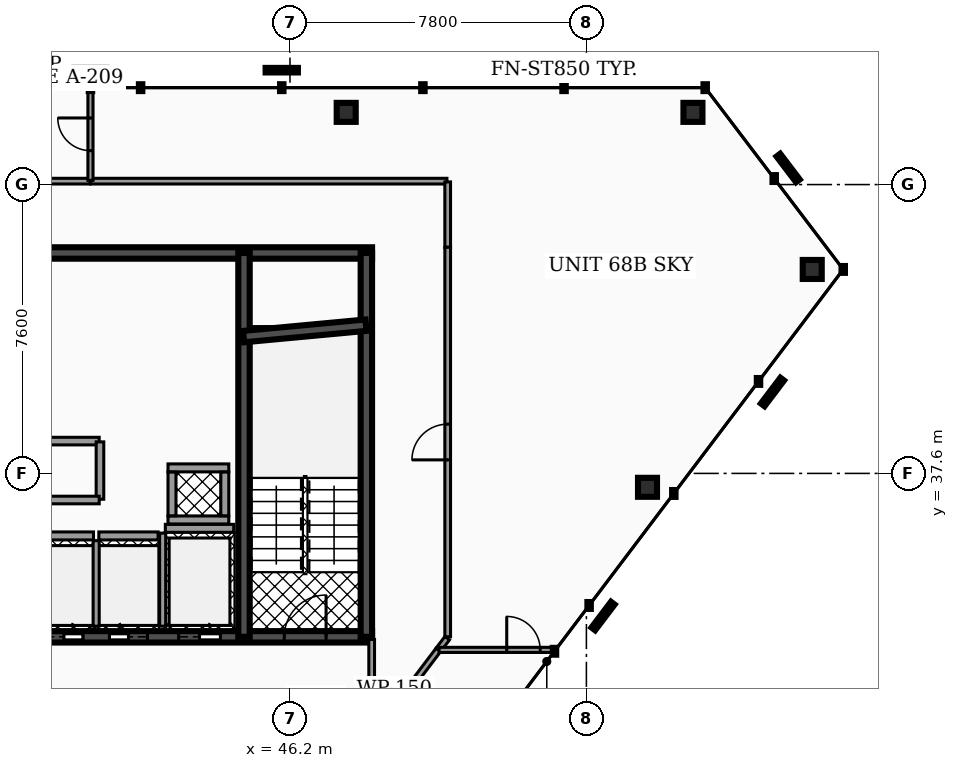
"""IFC4 building model, lengths in metres.
Left out: names, types, materials, properties, quantities, classifications, styles, units other than length and angle.
Written with IfcOpenShell. Run it as: python <this file> out.ifc"""

import sys

from ifc_helpers import new_model, si_unit, direction, frame, frame_2d, origin, origin_2d, place, context, subcontext, project, spatial, rectangle, hollow_rectangle, extrude, element, fill, save


model = new_model("IFC4")
c1 = context("Model", 3, precision=1e-05, world=origin(), true_north=direction((0.0, 1.0)))
c2 = subcontext(c1, "Body", "Model", "MODEL_VIEW")
j1 = project(units=[si_unit("LENGTHUNIT", "METRE"), si_unit("PLANEANGLEUNIT", "RADIAN")], contexts=[c1])
p1 = place(None, origin())
s1 = spatial("IfcSite", under=j1, at=p1, CompositionType="ELEMENT")
p2 = place(p1, origin())
s2 = spatial("IfcBuilding", under=s1, at=p2, CompositionType="ELEMENT")
p3 = place(p2, frame((0.0, 0.0, 268.6)))
s3 = spatial("IfcBuildingStorey", under=s2, at=p3, CompositionType="ELEMENT", Elevation=268.6)
p4 = place(p3, frame((28.5, 43.4, 0.0), z_axis=(0.0, 0.0, 1.0), x_axis=(1.0, 0.0, 0.0)))
e1 = element("IfcWall", 1, at=p4, inside=s3, PredefinedType="SHEAR", context=c2, shape_type="SweptSolid", body=[
    extrude(rectangle(XDim=19.86, YDim=0.3, at=frame_2d((9.93, 0.0))), origin(), (0.0, 0.0, 1.0), 3.18),
])
p5 = place(p3, frame((28.5, 33.3, 0.0), z_axis=(0.0, 0.0, 1.0), x_axis=(1.0, 0.0, 0.0)))
e2 = element("IfcWall", 2, at=p5, inside=s3, PredefinedType="SHEAR", context=c2, shape_type="SweptSolid", body=[
    extrude(rectangle(XDim=19.86, YDim=0.3, at=frame_2d((9.93, 0.0))), origin(), (0.0, 0.0, 1.0), 3.18),
])
p6 = place(p5, frame((3.93, 0.0, 0.0)))
e3 = element("IfcOpeningElement", 3, at=p6, cuts=e2, PredefinedType="OPENING", context=c2, shape_type="SweptSolid", body=[
    extrude(rectangle(XDim=1.1, YDim=2.15, at=frame_2d((0.55, 1.075))), frame((0.0, 0.16, 0.0), z_axis=(0.0, -1.0, 0.0), x_axis=(1.0, 0.0, 0.0)), (0.0, 0.0, 1.0), 0.32),
])
p7 = place(p5, frame((14.77, 0.0, 0.0)))
e4 = element("IfcOpeningElement", 4, at=p7, cuts=e2, PredefinedType="OPENING", context=c2, shape_type="SweptSolid", body=[
    extrude(rectangle(XDim=1.1, YDim=2.15, at=frame_2d((0.55, 1.075))), frame((0.0, 0.16, 0.0), z_axis=(0.0, -1.0, 0.0), x_axis=(1.0, 0.0, 0.0)), (0.0, 0.0, 1.0), 0.32),
])
p8 = place(p5, frame((11.25, 0.0, 0.0)))
e5 = element("IfcOpeningElement", 5, at=p8, cuts=e2, PredefinedType="OPENING", context=c2, shape_type="SweptSolid", body=[
    extrude(rectangle(XDim=1.0, YDim=2.1, at=frame_2d((0.5, 1.05))), frame((0.0, 0.16, 0.0), z_axis=(0.0, -1.0, 0.0), x_axis=(1.0, 0.0, 0.0)), (0.0, 0.0, 1.0), 0.32),
])
p9 = place(p5, frame((12.95, 0.0, 0.0)))
e6 = element("IfcOpeningElement", 6, at=p9, cuts=e2, PredefinedType="OPENING", context=c2, shape_type="SweptSolid", body=[
    extrude(rectangle(XDim=1.0, YDim=2.1, at=frame_2d((0.5, 1.05))), frame((0.0, 0.16, 0.0), z_axis=(0.0, -1.0, 0.0), x_axis=(1.0, 0.0, 0.0)), (0.0, 0.0, 1.0), 0.32),
])
p10 = place(p5, frame((5.85, 0.0, 0.0)))
e7 = element("IfcOpeningElement", 7, at=p10, cuts=e2, PredefinedType="OPENING", context=c2, shape_type="SweptSolid", body=[
    extrude(rectangle(XDim=1.0, YDim=2.1, at=frame_2d((0.5, 1.05))), frame((0.0, 0.16, 0.0), z_axis=(0.0, -1.0, 0.0), x_axis=(1.0, 0.0, 0.0)), (0.0, 0.0, 1.0), 0.32),
])
p11 = place(p5, frame((1.21, 0.0, 0.0)))
e8 = element("IfcOpeningElement", 8, at=p11, cuts=e2, PredefinedType="OPENING", context=c2, shape_type="SweptSolid", body=[
    extrude(rectangle(XDim=1.1, YDim=2.2, at=frame_2d((0.55, 1.1))), frame((0.0, 0.16, 0.0), z_axis=(0.0, -1.0, 0.0), x_axis=(1.0, 0.0, 0.0)), (0.0, 0.0, 1.0), 0.32),
])
p12 = place(p5, frame((9.34, 0.0, 0.0)))
e9 = element("IfcOpeningElement", 9, at=p12, cuts=e2, PredefinedType="OPENING", context=c2, shape_type="SweptSolid", body=[
    extrude(rectangle(XDim=1.12, YDim=2.05, at=frame_2d((0.56, 1.025))), frame((0.0, 0.16, 0.0), z_axis=(0.0, -1.0, 0.0), x_axis=(1.0, 0.0, 0.0)), (0.0, 0.0, 1.0), 0.32),
])
p13 = place(p5, frame((17.55, 0.0, 0.0)))
e10 = element("IfcOpeningElement", 10, at=p13, cuts=e2, PredefinedType="OPENING", context=c2, shape_type="SweptSolid", body=[
    extrude(rectangle(XDim=1.1, YDim=2.2, at=frame_2d((0.55, 1.1))), frame((0.0, 0.16, 0.0), z_axis=(0.0, -1.0, 0.0), x_axis=(1.0, 0.0, 0.0)), (0.0, 0.0, 1.0), 0.32),
])
for number, where, z_axis, x_axis in (
    (11, (44.99, 33.3, 0.0), (0.0, 0.0, 1.0), (0.0, 1.0, 0.0)),
    (12, (48.21, 33.3, 0.0), (0.0, 0.0, 1.0), (0.0, 1.0, 0.0)),
):
    element("IfcWall", number, at=place(p3, frame(where, z_axis=z_axis, x_axis=x_axis)), inside=s3, PredefinedType="SHEAR", context=c2, shape_type="SweptSolid", body=[
        extrude(rectangle(XDim=10.1, YDim=0.3, at=frame_2d((5.05, 0.0))), origin(), (0.0, 0.0, 1.0), 3.18),
    ])
p14 = place(p3, frame((44.98, 41.2, 0.0), z_axis=(0.0, 0.0, 1.0), x_axis=(0.995686468965, 0.09278176286, 0.0)))
e13 = element("IfcWall", 13, at=p14, inside=s3, PredefinedType="SHEAR", context=c2, shape_type="SweptSolid", body=[
    extrude(rectangle(XDim=3.234, YDim=0.3, at=frame_2d((1.617, 0.0))), origin(), (0.0, 0.0, 1.0), 3.18),
])
for number, where, z_axis, x_axis in (
    (14, (56.804, 47.1, 0.0), (0.0, 0.0, 1.0), (1.0, 0.0, 0.0)),
    (15, (47.679, 47.1, 0.0), (0.0, 0.0, 1.0), (1.0, 0.0, 0.0)),
    (16, (55.608, 37.234, 0.0), (0.0, 0.0, 1.0), (1.0, 0.0, 0.0)),
    (17, (59.943, 42.967, 0.0), (0.0, 0.0, 1.0), (1.0, 0.0, 0.0)),
):
    element("IfcColumn", number, at=place(p3, frame(where, z_axis=z_axis, x_axis=x_axis)), inside=s3, PredefinedType="COLUMN", context=c2, shape_type="SweptSolid", body=[
        extrude(hollow_rectangle(XDim=0.5, YDim=0.5, WallThickness=0.025, at=origin_2d()), origin(), (0.0, 0.0, 1.0), 3.18),
    ])
p15 = place(p3, frame((42.92, 36.155, 0.0), z_axis=(0.0, 0.0, 1.0), x_axis=(1.0, 0.0, 0.0)))
e18 = element("IfcWall", 18, at=p15, inside=s3, PredefinedType="SOLIDWALL", context=c2, shape_type="SweptSolid", body=[
    extrude(rectangle(XDim=1.8, YDim=0.21, at=frame_2d((0.9, 0.0))), origin(), (0.0, 0.0, 1.0), 3.18),
])
p16 = place(p3, frame((42.85, 33.58, 0.0), z_axis=(0.0, 0.0, 1.0), x_axis=(0.0, 1.0, 0.0)))
e19 = element("IfcWall", 19, at=p16, inside=s3, PredefinedType="SOLIDWALL", context=c2, shape_type="SweptSolid", body=[
    extrude(rectangle(XDim=2.45, YDim=0.16, at=frame_2d((1.225, 0.0))), origin(), (0.0, 0.0, 1.0), 3.18),
])
p17 = place(p3, frame((39.47, 35.955, 0.0), z_axis=(0.0, 0.0, 1.0), x_axis=(1.0, 0.0, 0.0)))
e20 = element("IfcWall", 20, at=p17, inside=s3, PredefinedType="SOLIDWALL", context=c2, shape_type="SweptSolid", body=[
    extrude(rectangle(XDim=1.56, YDim=0.21, at=frame_2d((0.78, 0.0))), origin(), (0.0, 0.0, 1.0), 3.18),
])
p18 = place(p3, frame((41.1, 33.58, 0.0), z_axis=(0.0, 0.0, 1.0), x_axis=(0.0, 1.0, 0.0)))
e21 = element("IfcWall", 21, at=p18, inside=s3, PredefinedType="SOLIDWALL", context=c2, shape_type="SweptSolid", body=[
    extrude(rectangle(XDim=2.25, YDim=0.16, at=frame_2d((1.125, 0.0))), origin(), (0.0, 0.0, 1.0), 3.18),
])
p19 = place(p3, frame((41.17, 35.955, 0.0), z_axis=(0.0, 0.0, 1.0), x_axis=(1.0, 0.0, 0.0)))
e22 = element("IfcWall", 22, at=p19, inside=s3, PredefinedType="SOLIDWALL", context=c2, shape_type="SweptSolid", body=[
    extrude(rectangle(XDim=1.56, YDim=0.21, at=frame_2d((0.78, 0.0))), origin(), (0.0, 0.0, 1.0), 3.18),
])
for number, where, z_axis, x_axis in (
    (23, (42.99, 36.375, 0.0), (0.0, 0.0, 1.0), (1.0, 0.0, 0.0)),
    (24, (42.99, 37.745, 0.0), (0.0, 0.0, 1.0), (1.0, 0.0, 0.0)),
):
    element("IfcWall", number, at=place(p3, frame(where, z_axis=z_axis, x_axis=x_axis)), inside=s3, PredefinedType="SOLIDWALL", context=c2, shape_type="SweptSolid", body=[
        extrude(rectangle(XDim=1.6, YDim=0.21, at=frame_2d((0.8, 0.0))), origin(), (0.0, 0.0, 1.0), 3.18),
    ])
for number, where, z_axis, x_axis in (
    (25, (43.095, 36.485, 0.0), (0.0, 0.0, 1.0), (0.0, 1.0, 0.0)),
    (26, (44.485, 36.485, 0.0), (0.0, 0.0, 1.0), (0.0, 1.0, 0.0)),
):
    element("IfcWall", number, at=place(p3, frame(where, z_axis=z_axis, x_axis=x_axis)), inside=s3, PredefinedType="SOLIDWALL", context=c2, shape_type="SweptSolid", body=[
        extrude(rectangle(XDim=1.15, YDim=0.21, at=frame_2d((0.575, 0.0))), origin(), (0.0, 0.0, 1.0), 3.18),
    ])
p20 = place(p3, frame((39.27, 38.45, 0.0), z_axis=(0.0, 0.0, 1.0), x_axis=(1.0, 0.0, 0.0)))
e27 = element("IfcWall", 27, at=p20, inside=s3, PredefinedType="PARTITIONING", context=c2, shape_type="SweptSolid", body=[
    extrude(rectangle(XDim=1.91, YDim=0.2, at=frame_2d((0.955, 0.0))), origin(), (0.0, 0.0, 1.0), 2.235),
])
p21 = place(p3, frame((41.2, 36.92, 0.0), z_axis=(0.0, 0.0, 1.0), x_axis=(0.0, 1.0, 0.0)))
e28 = element("IfcWall", 28, at=p21, inside=s3, PredefinedType="PARTITIONING", context=c2, shape_type="SweptSolid", body=[
    extrude(rectangle(XDim=1.51, YDim=0.2, at=frame_2d((0.755, 0.0))), origin(), (0.0, 0.0, 1.0), 2.235),
])
p22 = place(p3, frame((39.27, 36.9, 0.0), z_axis=(0.0, 0.0, 1.0), x_axis=(1.0, 0.0, 0.0)))
e29 = element("IfcWall", 29, at=p22, inside=s3, PredefinedType="PARTITIONING", context=c2, shape_type="SweptSolid", body=[
    extrude(rectangle(XDim=1.91, YDim=0.2, at=frame_2d((0.955, 0.0))), origin(), (0.0, 0.0, 1.0), 2.235),
])
p23 = place(p3, frame((48.35, 30.643, 0.0), z_axis=(0.0, 0.0, 1.0), x_axis=(0.0, 1.0, 0.0)))
e30 = element("IfcWall", 30, at=p23, inside=s3, PredefinedType="PARTITIONING", context=c2, shape_type="SweptSolid", body=[
    extrude(rectangle(XDim=2.587, YDim=0.15, at=frame_2d((1.294, 0.0))), origin(), (0.0, 0.0, 1.0), 2.235),
])
p24 = place(p3, frame((40.955, 45.29, 0.0), z_axis=(0.0, 0.0, 1.0), x_axis=(1.0, 0.0, 0.0)))
e31 = element("IfcWall", 31, at=p24, inside=s3, PredefinedType="PARTITIONING", context=c2, shape_type="SweptSolid", body=[
    extrude(rectangle(XDim=9.375, YDim=0.15, at=frame_2d((4.688, 0.0))), origin(), (0.0, 0.0, 1.0), 2.235),
])
p25 = place(p3, frame((50.35, 43.55, 0.0), z_axis=(0.0, 0.0, 1.0), x_axis=(0.0, 1.0, 0.0)))
e32 = element("IfcWall", 32, at=p25, inside=s3, PredefinedType="PARTITIONING", context=c2, shape_type="SweptSolid", body=[
    extrude(rectangle(XDim=1.72, YDim=0.15, at=frame_2d((0.86, 0.0))), origin(), (0.0, 0.0, 1.0), 2.235),
])
p26 = place(p3, frame((50.35, 33.302, 0.0), z_axis=(0.0, 0.0, 1.0), x_axis=(0.0, 1.0, 0.0)))
e33 = element("IfcWall", 33, at=p26, inside=s3, PredefinedType="PARTITIONING", context=c2, shape_type="SweptSolid", body=[
    extrude(rectangle(XDim=10.248, YDim=0.15, at=frame_2d((5.124, 0.0))), origin(), (0.0, 0.0, 1.0), 2.235),
])
p27 = place(p26, frame((4.654, 0.0, 0.0)))
e34 = element("IfcOpeningElement", 34, at=p27, cuts=e33, PredefinedType="OPENING", context=c2, shape_type="SweptSolid", body=[
    extrude(rectangle(XDim=0.94, YDim=2.05, at=frame_2d((0.47, 1.025))), frame((0.0, 0.085, 0.0), z_axis=(0.0, -1.0, 0.0), x_axis=(1.0, 0.0, 0.0)), (0.0, 0.0, 1.0), 0.17),
])
p28 = place(p3, frame((50.107, 32.96, 0.0), z_axis=(0.0, 0.0, 1.0), x_axis=(0.602950173728, 0.797778846549, 0.0)))
e35 = element("IfcWall", 35, at=p28, inside=s3, PredefinedType="PARTITIONING", context=c2, shape_type="SweptSolid", body=[
    extrude(rectangle(XDim=0.384, YDim=0.15, at=frame_2d((0.192, 0.0))), origin(), (0.0, 0.0, 1.0), 2.235),
])
p29 = place(p3, frame((48.362, 30.654, 0.0), z_axis=(0.0, 0.0, 1.0), x_axis=(0.603189668488, 0.79759778324, 0.0)))
e36 = element("IfcWall", 36, at=p29, inside=s3, PredefinedType="PARTITIONING", context=c2, shape_type="SweptSolid", body=[
    extrude(rectangle(XDim=2.886, YDim=0.15, at=frame_2d((1.443, 0.0))), origin(), (0.0, 0.0, 1.0), 2.235),
])
p30 = place(p3, frame((38.405, 45.29, 0.0), z_axis=(0.0, 0.0, 1.0), x_axis=(1.0, 0.0, 0.0)))
e37 = element("IfcWall", 37, at=p30, inside=s3, PredefinedType="PARTITIONING", context=c2, shape_type="SweptSolid", body=[
    extrude(rectangle(XDim=2.54, YDim=0.15, at=frame_2d((1.27, 0.0))), origin(), (0.0, 0.0, 1.0), 2.235),
])
p31 = place(p3, frame((50.124, 32.956, 0.0), z_axis=(0.0, 0.0, 1.0), x_axis=(1.0, 0.0, 0.0)))
e38 = element("IfcWall", 38, at=p31, inside=s3, PredefinedType="PARTITIONING", context=c2, shape_type="SweptSolid", body=[
    extrude(rectangle(XDim=3.049, YDim=0.135, at=frame_2d((1.525, 0.0))), origin(), (0.0, 0.0, 1.0), 2.235),
])
p32 = place(p31, frame((1.78, 0.0, 0.0)))
e39 = element("IfcOpeningElement", 39, at=p32, cuts=e38, PredefinedType="OPENING", context=c2, shape_type="SweptSolid", body=[
    extrude(rectangle(XDim=0.88, YDim=2.05, at=frame_2d((0.44, 1.025))), frame((0.0, 0.077, 0.0), z_axis=(0.0, -1.0, 0.0), x_axis=(1.0, 0.0, 0.0)), (0.0, 0.0, 1.0), 0.155),
])
p33 = place(p3, frame((40.95, 45.31, 0.0), z_axis=(0.0, 0.0, 1.0), x_axis=(0.0, 1.0, 0.0)))
e40 = element("IfcWall", 40, at=p33, inside=s3, PredefinedType="PARTITIONING", context=c2, shape_type="SweptSolid", body=[
    extrude(rectangle(XDim=2.425, YDim=0.135, at=frame_2d((1.212, 0.0))), origin(), (0.0, 0.0, 1.0), 2.235),
])
p34 = place(p33, frame((0.782, 0.0, 0.0)))
e41 = element("IfcOpeningElement", 41, at=p34, cuts=e40, PredefinedType="OPENING", context=c2, shape_type="SweptSolid", body=[
    extrude(rectangle(XDim=0.86, YDim=2.05, at=frame_2d((0.43, 1.025))), frame((0.0, 0.077, 0.0), z_axis=(0.0, -1.0, 0.0), x_axis=(1.0, 0.0, 0.0)), (0.0, 0.0, 1.0), 0.155),
])
p35 = place(p7, origin())
e42 = element("IfcDoor", 42, at=p35, inside=s3, OperationType="SLIDING_TO_RIGHT", PredefinedType="DOOR", context=c2, shape_type="SweptSolid", body=[
    extrude(rectangle(XDim=1.1, YDim=2.15, at=frame_2d((0.55, 1.075))), frame((0.0, 0.025, 0.0), z_axis=(0.0, -1.0, 0.0), x_axis=(1.0, 0.0, 0.0)), (0.0, 0.0, 1.0), 0.05),
])
fill(e4, e42)
p36 = place(p8, origin())
e43 = element("IfcDoor", 43, at=p36, inside=s3, OperationType="SLIDING_TO_RIGHT", PredefinedType="DOOR", context=c2, shape_type="SweptSolid", body=[
    extrude(rectangle(XDim=1.0, YDim=2.1, at=frame_2d((0.5, 1.05))), frame((0.0, 0.025, 0.0), z_axis=(0.0, -1.0, 0.0), x_axis=(1.0, 0.0, 0.0)), (0.0, 0.0, 1.0), 0.05),
])
fill(e5, e43)
p37 = place(p9, origin())
e44 = element("IfcDoor", 44, at=p37, inside=s3, OperationType="SLIDING_TO_LEFT", PredefinedType="DOOR", context=c2, shape_type="SweptSolid", body=[
    extrude(rectangle(XDim=1.0, YDim=2.1, at=frame_2d((0.5, 1.05))), frame((0.0, 0.025, 0.0), z_axis=(0.0, -1.0, 0.0), x_axis=(1.0, 0.0, 0.0)), (0.0, 0.0, 1.0), 0.05),
])
fill(e6, e44)
p38 = place(p13, origin())
e45 = element("IfcDoor", 45, at=p38, inside=s3, OperationType="SINGLE_SWING_RIGHT", PredefinedType="DOOR", context=c2, shape_type="SweptSolid", body=[
    extrude(rectangle(XDim=1.1, YDim=2.2, at=frame_2d((0.55, 1.1))), frame((0.0, 0.025, 0.0), z_axis=(0.0, -1.0, 0.0), x_axis=(1.0, 0.0, 0.0)), (0.0, 0.0, 1.0), 0.05),
])
fill(e10, e45)
p39 = place(p27, origin())
e46 = element("IfcDoor", 46, at=p39, inside=s3, OperationType="SINGLE_SWING_LEFT", PredefinedType="DOOR", context=c2, shape_type="SweptSolid", body=[
    extrude(rectangle(XDim=0.94, YDim=2.05, at=frame_2d((0.47, 1.025))), frame((0.0, 0.025, 0.0), z_axis=(0.0, -1.0, 0.0), x_axis=(1.0, 0.0, 0.0)), (0.0, 0.0, 1.0), 0.05),
])
fill(e34, e46)
p40 = place(p32, origin())
e47 = element("IfcDoor", 47, at=p40, inside=s3, OperationType="SINGLE_SWING_LEFT", PredefinedType="DOOR", context=c2, shape_type="SweptSolid", body=[
    extrude(rectangle(XDim=0.88, YDim=2.05, at=frame_2d((0.44, 1.025))), frame((0.0, 0.025, 0.0), z_axis=(0.0, -1.0, 0.0), x_axis=(1.0, 0.0, 0.0)), (0.0, 0.0, 1.0), 0.05),
])
fill(e39, e47)
p41 = place(p34, origin())
e48 = element("IfcDoor", 48, at=p41, inside=s3, OperationType="SINGLE_SWING_RIGHT", PredefinedType="DOOR", context=c2, shape_type="SweptSolid", body=[
    extrude(rectangle(XDim=0.86, YDim=2.05, at=frame_2d((0.43, 1.025))), frame((0.0, 0.025, 0.0), z_axis=(0.0, -1.0, 0.0), x_axis=(1.0, 0.0, 0.0)), (0.0, 0.0, 1.0), 0.05),
])
fill(e41, e48)
save(model, sys.argv[1])
